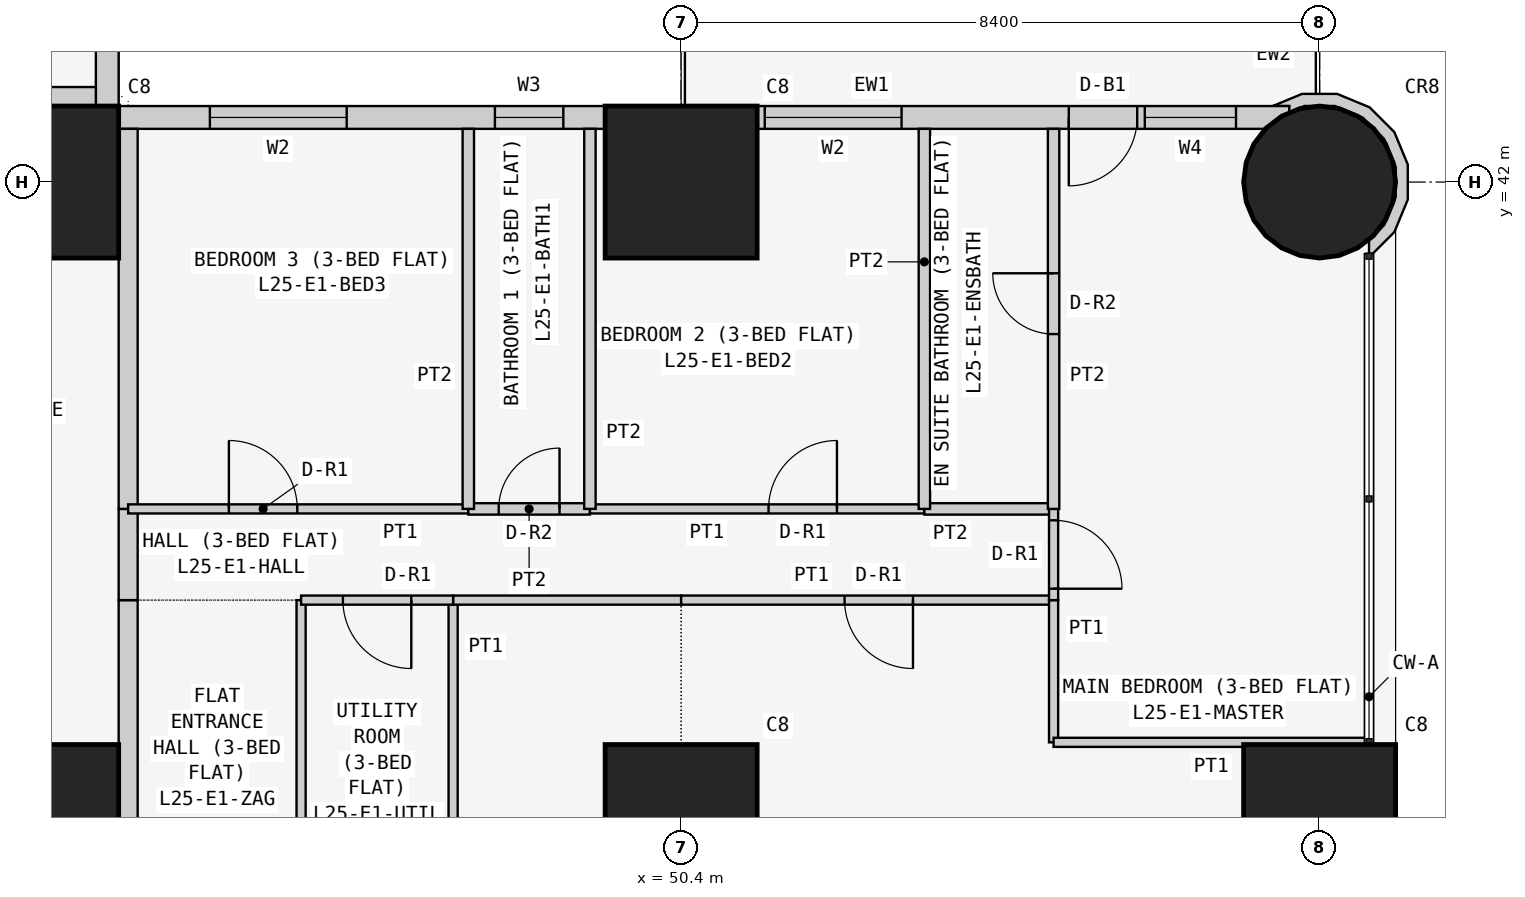
"""IFC4 building model, lengths in metres.
Left out: names, types, materials, properties, quantities, classifications, styles, units other than length and angle.
Written with IfcOpenShell. Run it as: python <this file> out.ifc"""

import sys

from ifc_helpers import new_model, si_unit, direction, frame, frame_2d, origin, origin_2d, place, context, subcontext, project, spatial, polyline, rectangle, circle, outline, extrude, element, fill, save


model = new_model("IFC4")
c1 = context("Model", 3, precision=1e-05, world=origin(), true_north=direction((0.0, 1.0)))
c2 = subcontext(c1, "Body", "Model", "MODEL_VIEW")
j1 = project(units=[si_unit("LENGTHUNIT", "METRE"), si_unit("PLANEANGLEUNIT", "RADIAN")], contexts=[c1])
p1 = place(None, origin())
s1 = spatial("IfcSite", under=j1, at=p1, CompositionType="ELEMENT")
p2 = place(p1, origin())
s2 = spatial("IfcBuilding", under=s1, at=p2, CompositionType="ELEMENT")
p3 = place(p2, frame((0.0, 0.0, 99.3)))
s3 = spatial("IfcBuildingStorey", under=s2, at=p3, CompositionType="ELEMENT", Elevation=99.3)
for number, where, z_axis, x_axis in (
    (1, (42.0, 33.6, 0.0), (0.0, 0.0, 1.0), (1.0, 0.0, 0.0)),
    (2, (42.0, 42.0, 0.0), (0.0, 0.0, 1.0), (1.0, 0.0, 0.0)),
    (3, (50.4, 33.6, 0.0), (0.0, 0.0, 1.0), (1.0, 0.0, 0.0)),
    (4, (50.4, 42.0, 0.0), (0.0, 0.0, 1.0), (1.0, 0.0, 0.0)),
    (5, (58.8, 33.6, 0.0), (0.0, 0.0, 1.0), (1.0, 0.0, 0.0)),
):
    element("IfcColumn", number, at=place(p3, frame(where, z_axis=z_axis, x_axis=x_axis)), inside=s3, PredefinedType="COLUMN", context=c2, shape_type="SweptSolid", body=[
        extrude(rectangle(XDim=2.0, YDim=2.0, at=origin_2d()), origin(), (0.0, 0.0, 1.0), 3.6),
    ])
p4 = place(p3, frame((58.8, 42.0, 0.0), z_axis=(0.0, 0.0, 1.0), x_axis=(1.0, 0.0, 0.0)))
e6 = element("IfcColumn", 6, at=p4, inside=s3, PredefinedType="COLUMN", context=c2, shape_type="SweptSolid", body=[
    extrude(circle(Radius=1.0, at=origin_2d()), origin(), (0.0, 0.0, 1.0), 3.6),
])
p5 = place(p3, frame((58.4, 42.85, 0.0), z_axis=(0.0, 0.0, 1.0), x_axis=(-1.0, 0.0, 0.0)))
e7 = element("IfcWall", 7, at=p5, inside=s3, PredefinedType="SOLIDWALL", context=c2, shape_type="SweptSolid", body=[
    extrude(rectangle(XDim=15.7, YDim=0.3, at=frame_2d((7.85, 0.0))), origin(), (0.0, 0.0, 1.0), 3.35),
])
p6 = place(p5, frame((12.4, 0.0, 0.9)))
e8 = element("IfcOpeningElement", 8, at=p6, cuts=e7, PredefinedType="OPENING", context=c2, shape_type="SweptSolid", body=[
    extrude(rectangle(XDim=1.8, YDim=1.5, at=frame_2d((0.9, 0.75))), frame((0.0, 0.16, 0.0), z_axis=(0.0, -1.0, 0.0), x_axis=(1.0, 0.0, 0.0)), (0.0, 0.0, 1.0), 0.32),
])
p7 = place(p5, frame((9.55, 0.0, 1.5)))
e9 = element("IfcOpeningElement", 9, at=p7, cuts=e7, PredefinedType="OPENING", context=c2, shape_type="SweptSolid", body=[
    extrude(rectangle(XDim=0.9, YDim=0.7, at=frame_2d((0.45, 0.35))), frame((0.0, 0.16, 0.0), z_axis=(0.0, -1.0, 0.0), x_axis=(1.0, 0.0, 0.0)), (0.0, 0.0, 1.0), 0.32),
])
p8 = place(p5, frame((5.1, 0.0, 0.9)))
e10 = element("IfcOpeningElement", 10, at=p8, cuts=e7, PredefinedType="OPENING", context=c2, shape_type="SweptSolid", body=[
    extrude(rectangle(XDim=1.8, YDim=1.5, at=frame_2d((0.9, 0.75))), frame((0.0, 0.16, 0.0), z_axis=(0.0, -1.0, 0.0), x_axis=(1.0, 0.0, 0.0)), (0.0, 0.0, 1.0), 0.32),
])
p9 = place(p5, frame((2.0, 0.0, 0.0)))
e11 = element("IfcOpeningElement", 11, at=p9, cuts=e7, PredefinedType="OPENING", context=c2, shape_type="SweptSolid", body=[
    extrude(rectangle(XDim=0.9, YDim=2.4, at=frame_2d((0.45, 1.2))), frame((0.0, 0.16, 0.0), z_axis=(0.0, -1.0, 0.0), x_axis=(1.0, 0.0, 0.0)), (0.0, 0.0, 1.0), 0.32),
])
p10 = place(p5, frame((0.7, 0.0, 0.9)))
e12 = element("IfcOpeningElement", 12, at=p10, cuts=e7, PredefinedType="OPENING", context=c2, shape_type="SweptSolid", body=[
    extrude(rectangle(XDim=1.2, YDim=1.5, at=frame_2d((0.6, 0.75))), frame((0.0, 0.16, 0.0), z_axis=(0.0, -1.0, 0.0), x_axis=(1.0, 0.0, 0.0)), (0.0, 0.0, 1.0), 0.32),
])
p11 = place(p3, frame((42.85, 43.0, 0.0), z_axis=(0.0, 0.0, 1.0), x_axis=(0.0, 1.0, 0.0)))
e13 = element("IfcWall", 13, at=p11, inside=s3, PredefinedType="SOLIDWALL", context=c2, shape_type="SweptSolid", body=[
    extrude(rectangle(XDim=15.4, YDim=0.3, at=frame_2d((7.7, 0.0))), origin(), (0.0, 0.0, 1.0), 3.35),
])
p12 = place(p11, frame((1.2, 0.0, 0.9)))
e14 = element("IfcOpeningElement", 14, at=p12, cuts=e13, PredefinedType="OPENING", context=c2, shape_type="SweptSolid", body=[
    extrude(rectangle(XDim=1.8, YDim=1.5, at=frame_2d((0.9, 0.75))), frame((0.0, 0.16, 0.0), z_axis=(0.0, -1.0, 0.0), x_axis=(1.0, 0.0, 0.0)), (0.0, 0.0, 1.0), 0.32),
])
p13 = place(p11, frame((4.95, 0.0, 1.5)))
e15 = element("IfcOpeningElement", 15, at=p13, cuts=e13, PredefinedType="OPENING", context=c2, shape_type="SweptSolid", body=[
    extrude(rectangle(XDim=0.9, YDim=0.7, at=frame_2d((0.45, 0.35))), frame((0.0, 0.16, 0.0), z_axis=(0.0, -1.0, 0.0), x_axis=(1.0, 0.0, 0.0)), (0.0, 0.0, 1.0), 0.32),
])
p14 = place(p11, frame((8.5, 0.0, 0.9)))
e16 = element("IfcOpeningElement", 16, at=p14, cuts=e13, PredefinedType="OPENING", context=c2, shape_type="SweptSolid", body=[
    extrude(rectangle(XDim=1.8, YDim=1.5, at=frame_2d((0.9, 0.75))), frame((0.0, 0.16, 0.0), z_axis=(0.0, -1.0, 0.0), x_axis=(1.0, 0.0, 0.0)), (0.0, 0.0, 1.0), 0.32),
])
p15 = place(p11, frame((12.5, 0.0, 0.0)))
e17 = element("IfcOpeningElement", 17, at=p15, cuts=e13, PredefinedType="OPENING", context=c2, shape_type="SweptSolid", body=[
    extrude(rectangle(XDim=0.9, YDim=2.4, at=frame_2d((0.45, 1.2))), frame((0.0, 0.16, 0.0), z_axis=(0.0, -1.0, 0.0), x_axis=(1.0, 0.0, 0.0)), (0.0, 0.0, 1.0), 0.32),
])
p16 = place(p11, frame((13.5, 0.0, 0.9)))
e18 = element("IfcOpeningElement", 18, at=p16, cuts=e13, PredefinedType="OPENING", context=c2, shape_type="SweptSolid", body=[
    extrude(rectangle(XDim=1.2, YDim=1.5, at=frame_2d((0.6, 0.75))), frame((0.0, 0.16, 0.0), z_axis=(0.0, -1.0, 0.0), x_axis=(1.0, 0.0, 0.0)), (0.0, 0.0, 1.0), 0.32),
])
p17 = place(p3, frame((59.443, 41.132, 0.0), z_axis=(0.0, 0.0, 1.0), x_axis=(0.831199417842, 0.555974394895, 0.0)))
e19 = element("IfcWall", 19, at=p17, inside=s3, PredefinedType="SOLIDWALL", context=c2, shape_type="SweptSolid", body=[
    extrude(outline(polyline([(0.784, 0.242), (1.04, 0.626), (1.13, 1.078), (1.04, 1.531), (0.784, 1.915), (0.401, 2.171), (-0.009, 2.253), (0.171, 2.132), (0.113, 2.066), (0.339, 2.021), (0.67, 1.8), (0.891, 1.469), (0.968, 1.078), (0.89, 0.688), (0.669, 0.357), (0.338, 0.136), (0.062, 0.081), (-0.036, -0.066), (0.005, -0.093), (0.4, -0.014), (0.784, 0.242)])), origin(), (0.0, 0.0, 1.0), 3.35),
])
p18 = place(p3, frame((37.7, 43.125, 0.0), z_axis=(0.0, 0.0, 1.0), x_axis=(1.0, 0.0, 0.0)))
e20 = element("IfcWall", 20, at=p18, inside=s3, PredefinedType="PARTITIONING", context=c2, shape_type="SweptSolid", body=[
    extrude(rectangle(XDim=5.0, YDim=0.25, at=frame_2d((2.5, 0.0))), origin(), (0.0, 0.0, 1.0), 3.35),
])
p19 = place(p3, frame((43.125, 36.5, 0.0), z_axis=(0.0, 0.0, 1.0), x_axis=(0.0, -1.0, 0.0)))
e21 = element("IfcWall", 21, at=p19, inside=s3, PredefinedType="PARTITIONING", context=c2, shape_type="SweptSolid", body=[
    extrude(rectangle(XDim=7.1, YDim=0.25, at=frame_2d((3.55, 0.0))), origin(), (0.0, 0.0, 1.0), 3.35),
])
p20 = place(p19, frame((4.1, 0.0, 0.0)))
e22 = element("IfcOpeningElement", 22, at=p20, cuts=e21, PredefinedType="OPENING", context=c2, shape_type="SweptSolid", body=[
    extrude(rectangle(XDim=1.0, YDim=2.1, at=frame_2d((0.5, 1.05))), frame((0.0, 0.135, 0.0), z_axis=(0.0, -1.0, 0.0), x_axis=(1.0, 0.0, 0.0)), (0.0, 0.0, 1.0), 0.27),
])
p21 = place(p3, frame((43.125, 37.7, 0.0), z_axis=(0.0, 0.0, 1.0), x_axis=(0.0, -1.0, 0.0)))
e23 = element("IfcWall", 23, at=p21, inside=s3, PredefinedType="PARTITIONING", context=c2, shape_type="SweptSolid", body=[
    extrude(rectangle(XDim=1.2, YDim=0.25, at=frame_2d((0.6, 0.0))), origin(), (0.0, 0.0, 1.0), 3.35),
])
p22 = place(p3, frame((43.125, 42.7, 0.0), z_axis=(0.0, 0.0, 1.0), x_axis=(0.0, -1.0, 0.0)))
e24 = element("IfcWall", 24, at=p22, inside=s3, PredefinedType="PARTITIONING", context=c2, shape_type="SweptSolid", body=[
    extrude(rectangle(XDim=5.0, YDim=0.25, at=frame_2d((2.5, 0.0))), origin(), (0.0, 0.0, 1.0), 3.35),
])
for number, where, z_axis, x_axis in (
    (25, (45.4, 33.4, 0.0), (0.0, 0.0, 1.0), (0.0, 1.0, 0.0)),
    (26, (47.4, 33.4, 0.0), (0.0, 0.0, 1.0), (0.0, 1.0, 0.0)),
):
    element("IfcWall", number, at=place(p3, frame(where, z_axis=z_axis, x_axis=x_axis)), inside=s3, PredefinedType="PARTITIONING", context=c2, shape_type="SweptSolid", body=[
        extrude(rectangle(XDim=3.1, YDim=0.12, at=frame_2d((1.55, 0.0))), origin(), (0.0, 0.0, 1.0), 3.35),
    ])
p23 = place(p3, frame((47.4, 36.5, 0.0), z_axis=(0.0, 0.0, 1.0), x_axis=(1.0, 0.0, 0.0)))
e27 = element("IfcWall", 27, at=p23, inside=s3, PredefinedType="PARTITIONING", context=c2, shape_type="SweptSolid", body=[
    extrude(rectangle(XDim=3.0, YDim=0.12, at=frame_2d((1.5, 0.0))), origin(), (0.0, 0.0, 1.0), 3.35),
])
p24 = place(p3, frame((47.4, 36.5, 0.0), z_axis=(0.0, 0.0, 1.0), x_axis=(-1.0, 0.0, 0.0)))
e28 = element("IfcWall", 28, at=p24, inside=s3, PredefinedType="PARTITIONING", context=c2, shape_type="SweptSolid", body=[
    extrude(rectangle(XDim=2.0, YDim=0.12, at=frame_2d((1.0, 0.0))), origin(), (0.0, 0.0, 1.0), 3.35),
])
p25 = place(p24, frame((0.55, 0.0, 0.0)))
e29 = element("IfcOpeningElement", 29, at=p25, cuts=e28, PredefinedType="OPENING", context=c2, shape_type="SweptSolid", body=[
    extrude(rectangle(XDim=0.9, YDim=2.1, at=frame_2d((0.45, 1.05))), frame((0.0, 0.07, 0.0), z_axis=(0.0, -1.0, 0.0), x_axis=(1.0, 0.0, 0.0)), (0.0, 0.0, 1.0), 0.14),
])
p26 = place(p3, frame((50.4, 36.5, 0.0), z_axis=(0.0, 0.0, 1.0), x_axis=(1.0, 0.0, 0.0)))
e30 = element("IfcWall", 30, at=p26, inside=s3, PredefinedType="PARTITIONING", context=c2, shape_type="SweptSolid", body=[
    extrude(rectangle(XDim=4.9, YDim=0.12, at=frame_2d((2.45, 0.0))), origin(), (0.0, 0.0, 1.0), 3.35),
])
p27 = place(p26, frame((2.15, 0.0, 0.0)))
e31 = element("IfcOpeningElement", 31, at=p27, cuts=e30, PredefinedType="OPENING", context=c2, shape_type="SweptSolid", body=[
    extrude(rectangle(XDim=0.9, YDim=2.1, at=frame_2d((0.45, 1.05))), frame((0.0, 0.07, 0.0), z_axis=(0.0, -1.0, 0.0), x_axis=(1.0, 0.0, 0.0)), (0.0, 0.0, 1.0), 0.14),
])
p28 = place(p3, frame((55.3, 36.5, 0.0), z_axis=(0.0, 0.0, 1.0), x_axis=(0.0, -1.0, 0.0)))
e32 = element("IfcWall", 32, at=p28, inside=s3, PredefinedType="PARTITIONING", context=c2, shape_type="SweptSolid", body=[
    extrude(rectangle(XDim=1.871, YDim=0.12, at=frame_2d((0.936, 0.0))), origin(), (0.0, 0.0, 1.0), 3.35),
])
p29 = place(p3, frame((55.3, 34.629, 0.0), z_axis=(0.0, 0.0, 1.0), x_axis=(1.0, 0.0, 0.0)))
e33 = element("IfcWall", 33, at=p29, inside=s3, PredefinedType="PARTITIONING", context=c2, shape_type="SweptSolid", body=[
    extrude(rectangle(XDim=4.15, YDim=0.12, at=frame_2d((2.075, 0.0))), origin(), (0.0, 0.0, 1.0), 3.35),
])
p30 = place(p3, frame((47.6, 37.7, 0.0), z_axis=(0.0, 0.0, 1.0), x_axis=(-1.0, 0.0, 0.0)))
e34 = element("IfcWall", 34, at=p30, inside=s3, PredefinedType="PARTITIONING", context=c2, shape_type="SweptSolid", body=[
    extrude(rectangle(XDim=4.475, YDim=0.12, at=frame_2d((2.238, 0.0))), origin(), (0.0, 0.0, 1.0), 3.35),
])
p31 = place(p30, frame((2.25, 0.0, 0.0)))
e35 = element("IfcOpeningElement", 35, at=p31, cuts=e34, PredefinedType="OPENING", context=c2, shape_type="SweptSolid", body=[
    extrude(rectangle(XDim=0.9, YDim=2.1, at=frame_2d((0.45, 1.05))), frame((0.0, 0.07, 0.0), z_axis=(0.0, -1.0, 0.0), x_axis=(1.0, 0.0, 0.0)), (0.0, 0.0, 1.0), 0.14),
])
p32 = place(p3, frame((49.2, 37.7, 0.0), z_axis=(0.0, 0.0, 1.0), x_axis=(-1.0, 0.0, 0.0)))
e36 = element("IfcWall", 36, at=p32, inside=s3, PredefinedType="PARTITIONING", context=c2, shape_type="SweptSolid", body=[
    extrude(rectangle(XDim=1.6, YDim=0.15, at=frame_2d((0.8, 0.0))), origin(), (0.0, 0.0, 1.0), 3.35),
])
p33 = place(p32, frame((0.4, 0.0, 0.0)))
e37 = element("IfcOpeningElement", 37, at=p33, cuts=e36, PredefinedType="OPENING", context=c2, shape_type="SweptSolid", body=[
    extrude(rectangle(XDim=0.8, YDim=2.1, at=frame_2d((0.4, 1.05))), frame((0.0, 0.085, 0.0), z_axis=(0.0, -1.0, 0.0), x_axis=(1.0, 0.0, 0.0)), (0.0, 0.0, 1.0), 0.17),
])
p34 = place(p3, frame((53.6, 37.7, 0.0), z_axis=(0.0, 0.0, 1.0), x_axis=(-1.0, 0.0, 0.0)))
e38 = element("IfcWall", 38, at=p34, inside=s3, PredefinedType="PARTITIONING", context=c2, shape_type="SweptSolid", body=[
    extrude(rectangle(XDim=4.4, YDim=0.12, at=frame_2d((2.2, 0.0))), origin(), (0.0, 0.0, 1.0), 3.35),
])
p35 = place(p34, frame((1.15, 0.0, 0.0)))
e39 = element("IfcOpeningElement", 39, at=p35, cuts=e38, PredefinedType="OPENING", context=c2, shape_type="SweptSolid", body=[
    extrude(rectangle(XDim=0.9, YDim=2.1, at=frame_2d((0.45, 1.05))), frame((0.0, 0.07, 0.0), z_axis=(0.0, -1.0, 0.0), x_axis=(1.0, 0.0, 0.0)), (0.0, 0.0, 1.0), 0.14),
])
p36 = place(p3, frame((55.3, 37.7, 0.0), z_axis=(0.0, 0.0, 1.0), x_axis=(-1.0, 0.0, 0.0)))
e40 = element("IfcWall", 40, at=p36, inside=s3, PredefinedType="PARTITIONING", context=c2, shape_type="SweptSolid", body=[
    extrude(rectangle(XDim=1.7, YDim=0.15, at=frame_2d((0.85, 0.0))), origin(), (0.0, 0.0, 1.0), 3.35),
])
p37 = place(p3, frame((55.3, 36.5, 0.0), z_axis=(0.0, 0.0, 1.0), x_axis=(0.0, 1.0, 0.0)))
e41 = element("IfcWall", 41, at=p37, inside=s3, PredefinedType="PARTITIONING", context=c2, shape_type="SweptSolid", body=[
    extrude(rectangle(XDim=1.2, YDim=0.12, at=frame_2d((0.6, 0.0))), origin(), (0.0, 0.0, 1.0), 3.35),
])
p38 = place(p37, frame((0.15, 0.0, 0.0)))
e42 = element("IfcOpeningElement", 42, at=p38, cuts=e41, PredefinedType="OPENING", context=c2, shape_type="SweptSolid", body=[
    extrude(rectangle(XDim=0.9, YDim=2.1, at=frame_2d((0.45, 1.05))), frame((0.0, 0.07, 0.0), z_axis=(0.0, -1.0, 0.0), x_axis=(1.0, 0.0, 0.0)), (0.0, 0.0, 1.0), 0.14),
])
for number, where, z_axis, x_axis in (
    (43, (47.6, 37.7, 0.0), (0.0, 0.0, 1.0), (0.0, 1.0, 0.0)),
    (44, (49.2, 37.7, 0.0), (0.0, 0.0, 1.0), (0.0, 1.0, 0.0)),
    (45, (53.6, 37.7, 0.0), (0.0, 0.0, 1.0), (0.0, 1.0, 0.0)),
):
    element("IfcWall", number, at=place(p3, frame(where, z_axis=z_axis, x_axis=x_axis)), inside=s3, PredefinedType="PARTITIONING", context=c2, shape_type="SweptSolid", body=[
        extrude(rectangle(XDim=5.0, YDim=0.15, at=frame_2d((2.5, 0.0))), origin(), (0.0, 0.0, 1.0), 3.35),
    ])
p39 = place(p3, frame((55.3, 37.7, 0.0), z_axis=(0.0, 0.0, 1.0), x_axis=(0.0, 1.0, 0.0)))
e46 = element("IfcWall", 46, at=p39, inside=s3, PredefinedType="PARTITIONING", context=c2, shape_type="SweptSolid", body=[
    extrude(rectangle(XDim=5.0, YDim=0.15, at=frame_2d((2.5, 0.0))), origin(), (0.0, 0.0, 1.0), 3.35),
])
p40 = place(p39, frame((2.3, 0.0, 0.0)))
e47 = element("IfcOpeningElement", 47, at=p40, cuts=e46, PredefinedType="OPENING", context=c2, shape_type="SweptSolid", body=[
    extrude(rectangle(XDim=0.8, YDim=2.1, at=frame_2d((0.4, 1.05))), frame((0.0, 0.085, 0.0), z_axis=(0.0, -1.0, 0.0), x_axis=(1.0, 0.0, 0.0)), (0.0, 0.0, 1.0), 0.17),
])
p41 = place(p6, origin())
e48 = element("IfcWindow", 48, at=p41, inside=s3, PartitioningType="SINGLE_PANEL", PredefinedType="WINDOW", context=c2, shape_type="SweptSolid", body=[
    extrude(rectangle(XDim=1.8, YDim=1.5, at=frame_2d((0.9, 0.75))), frame((0.0, 0.03, 0.0), z_axis=(0.0, -1.0, 0.0), x_axis=(1.0, 0.0, 0.0)), (0.0, 0.0, 1.0), 0.06),
])
fill(e8, e48)
p42 = place(p7, origin())
e49 = element("IfcWindow", 49, at=p42, inside=s3, PartitioningType="SINGLE_PANEL", PredefinedType="WINDOW", context=c2, shape_type="SweptSolid", body=[
    extrude(rectangle(XDim=0.9, YDim=0.7, at=frame_2d((0.45, 0.35))), frame((0.0, 0.03, 0.0), z_axis=(0.0, -1.0, 0.0), x_axis=(1.0, 0.0, 0.0)), (0.0, 0.0, 1.0), 0.06),
])
fill(e9, e49)
p43 = place(p8, origin())
e50 = element("IfcWindow", 50, at=p43, inside=s3, PartitioningType="SINGLE_PANEL", PredefinedType="WINDOW", context=c2, shape_type="SweptSolid", body=[
    extrude(rectangle(XDim=1.8, YDim=1.5, at=frame_2d((0.9, 0.75))), frame((0.0, 0.03, 0.0), z_axis=(0.0, -1.0, 0.0), x_axis=(1.0, 0.0, 0.0)), (0.0, 0.0, 1.0), 0.06),
])
fill(e10, e50)
p44 = place(p9, origin())
e51 = element("IfcDoor", 51, at=p44, inside=s3, OperationType="SINGLE_SWING_RIGHT", PredefinedType="DOOR", context=c2, shape_type="SweptSolid", body=[
    extrude(rectangle(XDim=0.9, YDim=2.4, at=frame_2d((0.45, 1.2))), frame((0.0, 0.025, 0.0), z_axis=(0.0, -1.0, 0.0), x_axis=(1.0, 0.0, 0.0)), (0.0, 0.0, 1.0), 0.05),
])
fill(e11, e51)
p45 = place(p10, origin())
e52 = element("IfcWindow", 52, at=p45, inside=s3, PartitioningType="SINGLE_PANEL", PredefinedType="WINDOW", context=c2, shape_type="SweptSolid", body=[
    extrude(rectangle(XDim=1.2, YDim=1.5, at=frame_2d((0.6, 0.75))), frame((0.0, 0.03, 0.0), z_axis=(0.0, -1.0, 0.0), x_axis=(1.0, 0.0, 0.0)), (0.0, 0.0, 1.0), 0.06),
])
fill(e12, e52)
p46 = place(p25, origin())
e53 = element("IfcDoor", 53, at=p46, inside=s3, OperationType="SINGLE_SWING_LEFT", PredefinedType="DOOR", context=c2, shape_type="SweptSolid", body=[
    extrude(rectangle(XDim=0.9, YDim=2.1, at=frame_2d((0.45, 1.05))), frame((0.0, 0.025, 0.0), z_axis=(0.0, -1.0, 0.0), x_axis=(1.0, 0.0, 0.0)), (0.0, 0.0, 1.0), 0.05),
])
fill(e29, e53)
p47 = place(p27, frame((0.9, 0.0, 0.0), z_axis=(0.0, 0.0, 1.0), x_axis=(-1.0, 0.0, 0.0)))
e54 = element("IfcDoor", 54, at=p47, inside=s3, OperationType="SINGLE_SWING_LEFT", PredefinedType="DOOR", context=c2, shape_type="SweptSolid", body=[
    extrude(rectangle(XDim=0.9, YDim=2.1, at=frame_2d((0.45, 1.05))), frame((0.0, 0.025, 0.0), z_axis=(0.0, -1.0, 0.0), x_axis=(1.0, 0.0, 0.0)), (0.0, 0.0, 1.0), 0.05),
])
fill(e31, e54)
p48 = place(p31, frame((0.9, 0.0, 0.0), z_axis=(0.0, 0.0, 1.0), x_axis=(-1.0, 0.0, 0.0)))
e55 = element("IfcDoor", 55, at=p48, inside=s3, OperationType="SINGLE_SWING_LEFT", PredefinedType="DOOR", context=c2, shape_type="SweptSolid", body=[
    extrude(rectangle(XDim=0.9, YDim=2.1, at=frame_2d((0.45, 1.05))), frame((0.0, 0.025, 0.0), z_axis=(0.0, -1.0, 0.0), x_axis=(1.0, 0.0, 0.0)), (0.0, 0.0, 1.0), 0.05),
])
fill(e35, e55)
p49 = place(p33, frame((0.8, 0.0, 0.0), z_axis=(0.0, 0.0, 1.0), x_axis=(-1.0, 0.0, 0.0)))
e56 = element("IfcDoor", 56, at=p49, inside=s3, OperationType="SINGLE_SWING_RIGHT", PredefinedType="DOOR", context=c2, shape_type="SweptSolid", body=[
    extrude(rectangle(XDim=0.8, YDim=2.1, at=frame_2d((0.4, 1.05))), frame((0.0, 0.025, 0.0), z_axis=(0.0, -1.0, 0.0), x_axis=(1.0, 0.0, 0.0)), (0.0, 0.0, 1.0), 0.05),
])
fill(e37, e56)
p50 = place(p35, frame((0.9, 0.0, 0.0), z_axis=(0.0, 0.0, 1.0), x_axis=(-1.0, 0.0, 0.0)))
e57 = element("IfcDoor", 57, at=p50, inside=s3, OperationType="SINGLE_SWING_RIGHT", PredefinedType="DOOR", context=c2, shape_type="SweptSolid", body=[
    extrude(rectangle(XDim=0.9, YDim=2.1, at=frame_2d((0.45, 1.05))), frame((0.0, 0.025, 0.0), z_axis=(0.0, -1.0, 0.0), x_axis=(1.0, 0.0, 0.0)), (0.0, 0.0, 1.0), 0.05),
])
fill(e39, e57)
p51 = place(p38, frame((0.9, 0.0, 0.0), z_axis=(0.0, 0.0, 1.0), x_axis=(-1.0, 0.0, 0.0)))
e58 = element("IfcDoor", 58, at=p51, inside=s3, OperationType="SINGLE_SWING_RIGHT", PredefinedType="DOOR", context=c2, shape_type="SweptSolid", body=[
    extrude(rectangle(XDim=0.9, YDim=2.1, at=frame_2d((0.45, 1.05))), frame((0.0, 0.025, 0.0), z_axis=(0.0, -1.0, 0.0), x_axis=(1.0, 0.0, 0.0)), (0.0, 0.0, 1.0), 0.05),
])
fill(e42, e58)
p52 = place(p40, origin())
e59 = element("IfcDoor", 59, at=p52, inside=s3, OperationType="SINGLE_SWING_RIGHT", PredefinedType="DOOR", context=c2, shape_type="SweptSolid", body=[
    extrude(rectangle(XDim=0.8, YDim=2.1, at=frame_2d((0.4, 1.05))), frame((0.0, 0.025, 0.0), z_axis=(0.0, -1.0, 0.0), x_axis=(1.0, 0.0, 0.0)), (0.0, 0.0, 1.0), 0.05),
])
fill(e47, e59)
save(model, sys.argv[1])
